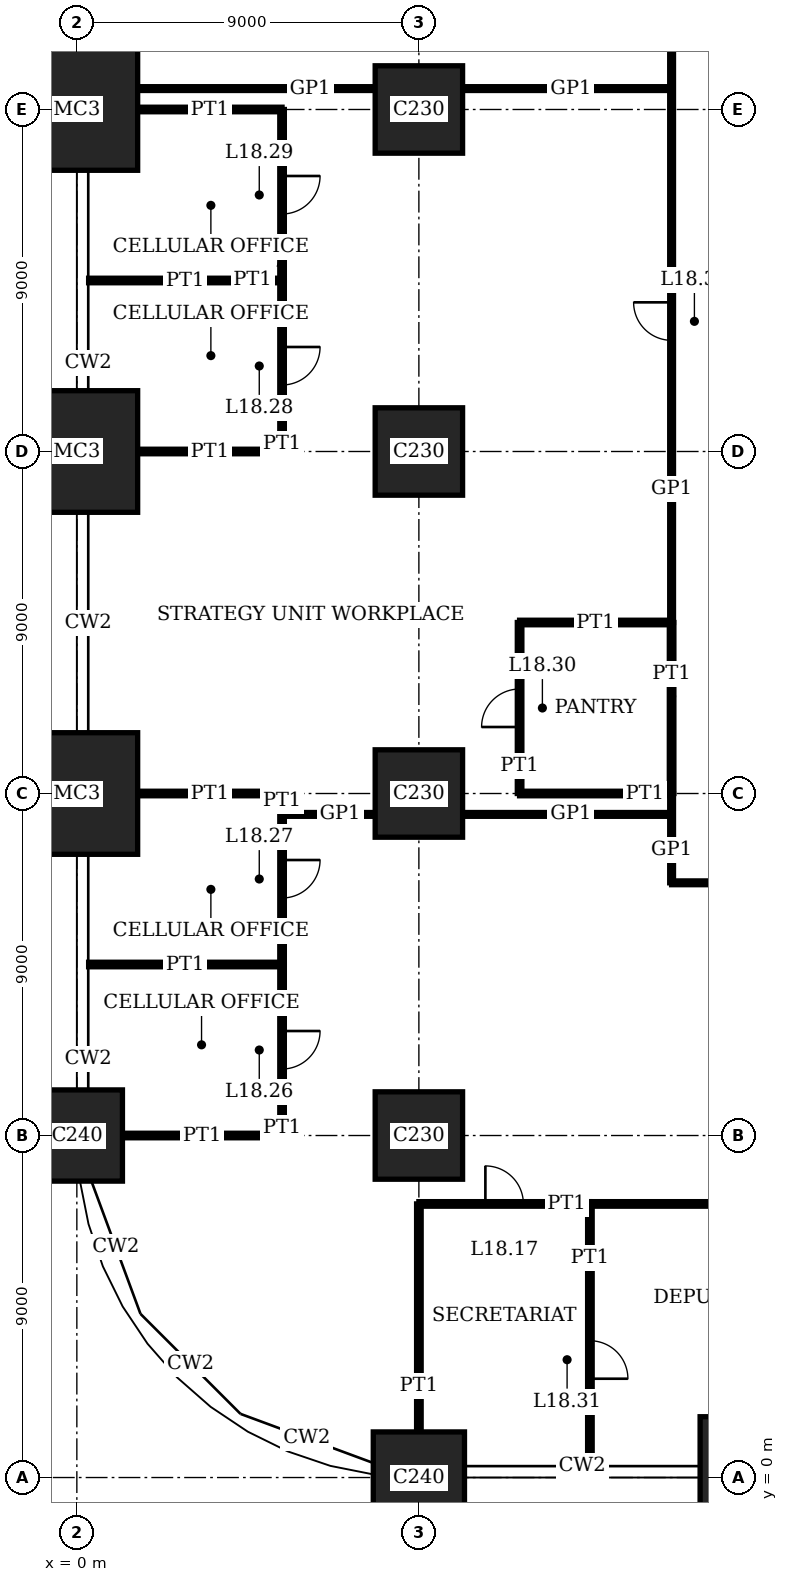
"""IFC4 building model, lengths in metres.
Left out: names, types, materials, properties, quantities, classifications, styles, units other than length and angle.
Written with IfcOpenShell. Run it as: python <this file> out.ifc"""

import sys

from ifc_helpers import new_model, si_unit, direction, frame, frame_2d, origin, origin_2d, place, context, subcontext, project, spatial, rectangle, extrude, element, fill, save


model = new_model("IFC4")
c1 = context("Model", 3, precision=1e-05, world=origin(), true_north=direction((0.0, 1.0)))
c2 = subcontext(c1, "Body", "Model", "MODEL_VIEW")
j1 = project(units=[si_unit("LENGTHUNIT", "METRE"), si_unit("PLANEANGLEUNIT", "RADIAN")], contexts=[c1])
p1 = place(None, origin())
s1 = spatial("IfcSite", under=j1, at=p1, CompositionType="ELEMENT")
p2 = place(p1, origin())
s2 = spatial("IfcBuilding", under=s1, at=p2, CompositionType="ELEMENT")
p3 = place(p2, frame((0.0, 0.0, 75.8)))
s3 = spatial("IfcBuildingStorey", under=s2, at=p3, CompositionType="ELEMENT", Elevation=75.8)
p4 = place(p3, frame((0.0, 9.0, 0.0), z_axis=(0.0, 0.0, 1.0), x_axis=(1.0, 0.0, 0.0)))
e1 = element("IfcColumn", 1, at=p4, inside=s3, PredefinedType="COLUMN", context=c2, shape_type="SweptSolid", body=[
    extrude(rectangle(XDim=2.4, YDim=2.4, at=origin_2d()), origin(), (0.0, 0.0, 1.0), 4.2),
])
for number, where, z_axis, x_axis in (
    (2, (0.0, 18.0, 0.0), (0.0, 0.0, 1.0), (1.0, 0.0, 0.0)),
    (3, (0.0, 27.0, 0.0), (0.0, 0.0, 1.0), (1.0, 0.0, 0.0)),
    (4, (0.0, 36.0, 0.0), (0.0, 0.0, 1.0), (1.0, 0.0, 0.0)),
):
    element("IfcColumn", number, at=place(p3, frame(where, z_axis=z_axis, x_axis=x_axis)), inside=s3, PredefinedType="COLUMN", context=c2, shape_type="SweptSolid", body=[
        extrude(rectangle(XDim=3.2, YDim=3.2, at=origin_2d()), origin(), (0.0, 0.0, 1.0), 4.2),
    ])
p5 = place(p3, frame((9.0, 0.0, 0.0), z_axis=(0.0, 0.0, 1.0), x_axis=(1.0, 0.0, 0.0)))
e5 = element("IfcColumn", 5, at=p5, inside=s3, PredefinedType="COLUMN", context=c2, shape_type="SweptSolid", body=[
    extrude(rectangle(XDim=2.4, YDim=2.4, at=origin_2d()), origin(), (0.0, 0.0, 1.0), 4.2),
])
for number, where, z_axis, x_axis in (
    (6, (9.0, 9.0, 0.0), (0.0, 0.0, 1.0), (1.0, 0.0, 0.0)),
    (7, (9.0, 18.0, 0.0), (0.0, 0.0, 1.0), (1.0, 0.0, 0.0)),
    (8, (9.0, 27.0, 0.0), (0.0, 0.0, 1.0), (1.0, 0.0, 0.0)),
    (9, (9.0, 36.0, 0.0), (0.0, 0.0, 1.0), (1.0, 0.0, 0.0)),
):
    element("IfcColumn", number, at=place(p3, frame(where, z_axis=z_axis, x_axis=x_axis)), inside=s3, PredefinedType="COLUMN", context=c2, shape_type="SweptSolid", body=[
        extrude(rectangle(XDim=2.3, YDim=2.3, at=origin_2d()), origin(), (0.0, 0.0, 1.0), 4.2),
    ])
p6 = place(p3, frame((18.0, 0.0, 0.0), z_axis=(0.0, 0.0, 1.0), x_axis=(1.0, 0.0, 0.0)))
e10 = element("IfcColumn", 10, at=p6, inside=s3, PredefinedType="COLUMN", context=c2, shape_type="SweptSolid", body=[
    extrude(rectangle(XDim=3.2, YDim=3.2, at=origin_2d()), origin(), (0.0, 0.0, 1.0), 4.2),
])
p7 = place(p3, frame((9.0, 7.2, 0.0), z_axis=(0.0, 0.0, 1.0), x_axis=(1.0, 0.0, 0.0)))
e11 = element("IfcWall", 11, at=p7, inside=s3, PredefinedType="PARTITIONING", context=c2, shape_type="SweptSolid", body=[
    extrude(rectangle(XDim=4.5, YDim=0.12, at=frame_2d((2.25, 0.0))), origin(), (0.0, 0.0, 1.0), 3.85),
])
p8 = place(p7, frame((1.75, 0.0, 0.0)))
e12 = element("IfcOpeningElement", 12, at=p8, cuts=e11, PredefinedType="OPENING", context=c2, shape_type="SweptSolid", body=[
    extrude(rectangle(XDim=1.0, YDim=2.4, at=frame_2d((0.5, 1.2))), frame((0.0, 0.07, 0.0), z_axis=(0.0, -1.0, 0.0), x_axis=(1.0, 0.0, 0.0)), (0.0, 0.0, 1.0), 0.14),
])
p9 = place(p3, frame((13.5, 7.2, 0.0), z_axis=(0.0, 0.0, 1.0), x_axis=(1.0, 0.0, 0.0)))
e13 = element("IfcWall", 13, at=p9, inside=s3, PredefinedType="PARTITIONING", context=c2, shape_type="SweptSolid", body=[
    extrude(rectangle(XDim=9.0, YDim=0.12, at=frame_2d((4.5, 0.0))), origin(), (0.0, 0.0, 1.0), 3.85),
])
p10 = place(p3, frame((1.2, 9.0, 0.0), z_axis=(0.0, 0.0, 1.0), x_axis=(1.0, 0.0, 0.0)))
e14 = element("IfcWall", 14, at=p10, inside=s3, PredefinedType="PARTITIONING", context=c2, shape_type="SweptSolid", body=[
    extrude(rectangle(XDim=4.2, YDim=0.12, at=frame_2d((2.1, 0.0))), origin(), (0.0, 0.0, 1.0), 3.05),
])
p11 = place(p3, frame((0.31, 13.5, 0.0), z_axis=(0.0, 0.0, 1.0), x_axis=(1.0, 0.0, 0.0)))
e15 = element("IfcWall", 15, at=p11, inside=s3, PredefinedType="PARTITIONING", context=c2, shape_type="SweptSolid", body=[
    extrude(rectangle(XDim=5.09, YDim=0.12, at=frame_2d((2.545, 0.0))), origin(), (0.0, 0.0, 1.0), 3.15),
])
p12 = place(p3, frame((15.65, 15.65, 0.0), z_axis=(0.0, 0.0, 1.0), x_axis=(1.0, 0.0, 0.0)))
e16 = element("IfcWall", 16, at=p12, inside=s3, PredefinedType="PARTITIONING", context=c2, shape_type="SweptSolid", body=[
    extrude(rectangle(XDim=24.85, YDim=0.1, at=frame_2d((12.425, 0.0))), origin(), (0.0, 0.0, 1.0), 3.85),
])
p13 = place(p12, frame((11.925, 0.0, 0.0)))
e17 = element("IfcOpeningElement", 17, at=p13, cuts=e16, PredefinedType="OPENING", context=c2, shape_type="SweptSolid", body=[
    extrude(rectangle(XDim=1.0, YDim=2.4, at=frame_2d((0.5, 1.2))), frame((0.0, 0.06, 0.0), z_axis=(0.0, -1.0, 0.0), x_axis=(1.0, 0.0, 0.0)), (0.0, 0.0, 1.0), 0.12),
])
p14 = place(p3, frame((5.39, 17.45, 0.0), z_axis=(0.0, 0.0, 1.0), x_axis=(1.0, 0.0, 0.0)))
e18 = element("IfcWall", 18, at=p14, inside=s3, PredefinedType="PARTITIONING", context=c2, shape_type="SweptSolid", body=[
    extrude(rectangle(XDim=2.46, YDim=0.1, at=frame_2d((1.23, 0.0))), origin(), (0.0, 0.0, 1.0), 3.85),
])
p15 = place(p3, frame((10.15, 17.45, 0.0), z_axis=(0.0, 0.0, 1.0), x_axis=(1.0, 0.0, 0.0)))
e19 = element("IfcWall", 19, at=p15, inside=s3, PredefinedType="PARTITIONING", context=c2, shape_type="SweptSolid", body=[
    extrude(rectangle(XDim=5.5, YDim=0.1, at=frame_2d((2.75, 0.0))), origin(), (0.0, 0.0, 1.0), 3.85),
])
p16 = place(p3, frame((11.65, 18.0, 0.0), z_axis=(0.0, 0.0, 1.0), x_axis=(1.0, 0.0, 0.0)))
e20 = element("IfcWall", 20, at=p16, inside=s3, PredefinedType="PARTITIONING", context=c2, shape_type="SweptSolid", body=[
    extrude(rectangle(XDim=4.0, YDim=0.12, at=frame_2d((2.0, 0.0))), origin(), (0.0, 0.0, 1.0), 3.25),
])
p17 = place(p3, frame((1.6, 18.0, 0.0), z_axis=(0.0, 0.0, 1.0), x_axis=(1.0, 0.0, 0.0)))
e21 = element("IfcWall", 21, at=p17, inside=s3, PredefinedType="PARTITIONING", context=c2, shape_type="SweptSolid", body=[
    extrude(rectangle(XDim=3.8, YDim=0.12, at=frame_2d((1.9, 0.0))), origin(), (0.0, 0.0, 1.0), 3.25),
])
p18 = place(p3, frame((11.65, 22.5, 0.0), z_axis=(0.0, 0.0, 1.0), x_axis=(1.0, 0.0, 0.0)))
e22 = element("IfcWall", 22, at=p18, inside=s3, PredefinedType="PARTITIONING", context=c2, shape_type="SweptSolid", body=[
    extrude(rectangle(XDim=4.0, YDim=0.12, at=frame_2d((2.0, 0.0))), origin(), (0.0, 0.0, 1.0), 3.15),
])
p19 = place(p3, frame((1.6, 27.0, 0.0), z_axis=(0.0, 0.0, 1.0), x_axis=(1.0, 0.0, 0.0)))
e23 = element("IfcWall", 23, at=p19, inside=s3, PredefinedType="PARTITIONING", context=c2, shape_type="SweptSolid", body=[
    extrude(rectangle(XDim=3.8, YDim=0.12, at=frame_2d((1.9, 0.0))), origin(), (0.0, 0.0, 1.0), 3.25),
])
p20 = place(p3, frame((0.31, 31.5, 0.0), z_axis=(0.0, 0.0, 1.0), x_axis=(1.0, 0.0, 0.0)))
e24 = element("IfcWall", 24, at=p20, inside=s3, PredefinedType="PARTITIONING", context=c2, shape_type="SweptSolid", body=[
    extrude(rectangle(XDim=5.09, YDim=0.12, at=frame_2d((2.545, 0.0))), origin(), (0.0, 0.0, 1.0), 3.15),
])
p21 = place(p3, frame((1.6, 36.0, 0.0), z_axis=(0.0, 0.0, 1.0), x_axis=(1.0, 0.0, 0.0)))
e25 = element("IfcWall", 25, at=p21, inside=s3, PredefinedType="PARTITIONING", context=c2, shape_type="SweptSolid", body=[
    extrude(rectangle(XDim=3.8, YDim=0.12, at=frame_2d((1.9, 0.0))), origin(), (0.0, 0.0, 1.0), 3.25),
])
p22 = place(p3, frame((1.6, 36.55, 0.0), z_axis=(0.0, 0.0, 1.0), x_axis=(1.0, 0.0, 0.0)))
e26 = element("IfcWall", 26, at=p22, inside=s3, PredefinedType="PARTITIONING", context=c2, shape_type="SweptSolid", body=[
    extrude(rectangle(XDim=6.25, YDim=0.1, at=frame_2d((3.125, 0.0))), origin(), (0.0, 0.0, 1.0), 3.85),
])
p23 = place(p3, frame((10.15, 36.55, 0.0), z_axis=(0.0, 0.0, 1.0), x_axis=(1.0, 0.0, 0.0)))
e27 = element("IfcWall", 27, at=p23, inside=s3, PredefinedType="PARTITIONING", context=c2, shape_type="SweptSolid", body=[
    extrude(rectangle(XDim=5.5, YDim=0.1, at=frame_2d((2.75, 0.0))), origin(), (0.0, 0.0, 1.0), 3.85),
])
p24 = place(p3, frame((5.4, 9.0, 0.0), z_axis=(0.0, 0.0, 1.0), x_axis=(0.0, 1.0, 0.0)))
e28 = element("IfcWall", 28, at=p24, inside=s3, PredefinedType="PARTITIONING", context=c2, shape_type="SweptSolid", body=[
    extrude(rectangle(XDim=4.5, YDim=0.12, at=frame_2d((2.25, 0.0))), origin(), (0.0, 0.0, 1.0), 3.85),
])
p25 = place(p24, frame((1.75, 0.0, 0.0)))
e29 = element("IfcOpeningElement", 29, at=p25, cuts=e28, PredefinedType="OPENING", context=c2, shape_type="SweptSolid", body=[
    extrude(rectangle(XDim=1.0, YDim=2.4, at=frame_2d((0.5, 1.2))), frame((0.0, 0.07, 0.0), z_axis=(0.0, -1.0, 0.0), x_axis=(1.0, 0.0, 0.0)), (0.0, 0.0, 1.0), 0.14),
])
p26 = place(p3, frame((5.4, 13.5, 0.0), z_axis=(0.0, 0.0, 1.0), x_axis=(0.0, 1.0, 0.0)))
e30 = element("IfcWall", 30, at=p26, inside=s3, PredefinedType="PARTITIONING", context=c2, shape_type="SweptSolid", body=[
    extrude(rectangle(XDim=4.5, YDim=0.12, at=frame_2d((2.25, 0.0))), origin(), (0.0, 0.0, 1.0), 3.85),
])
p27 = place(p26, frame((1.75, 0.0, 0.0)))
e31 = element("IfcOpeningElement", 31, at=p27, cuts=e30, PredefinedType="OPENING", context=c2, shape_type="SweptSolid", body=[
    extrude(rectangle(XDim=1.0, YDim=2.4, at=frame_2d((0.5, 1.2))), frame((0.0, 0.07, 0.0), z_axis=(0.0, -1.0, 0.0), x_axis=(1.0, 0.0, 0.0)), (0.0, 0.0, 1.0), 0.14),
])
p28 = place(p3, frame((5.4, 27.0, 0.0), z_axis=(0.0, 0.0, 1.0), x_axis=(0.0, 1.0, 0.0)))
e32 = element("IfcWall", 32, at=p28, inside=s3, PredefinedType="PARTITIONING", context=c2, shape_type="SweptSolid", body=[
    extrude(rectangle(XDim=4.5, YDim=0.12, at=frame_2d((2.25, 0.0))), origin(), (0.0, 0.0, 1.0), 3.85),
])
p29 = place(p28, frame((1.75, 0.0, 0.0)))
e33 = element("IfcOpeningElement", 33, at=p29, cuts=e32, PredefinedType="OPENING", context=c2, shape_type="SweptSolid", body=[
    extrude(rectangle(XDim=1.0, YDim=2.4, at=frame_2d((0.5, 1.2))), frame((0.0, 0.07, 0.0), z_axis=(0.0, -1.0, 0.0), x_axis=(1.0, 0.0, 0.0)), (0.0, 0.0, 1.0), 0.14),
])
p30 = place(p3, frame((5.4, 31.5, 0.0), z_axis=(0.0, 0.0, 1.0), x_axis=(0.0, 1.0, 0.0)))
e34 = element("IfcWall", 34, at=p30, inside=s3, PredefinedType="PARTITIONING", context=c2, shape_type="SweptSolid", body=[
    extrude(rectangle(XDim=4.5, YDim=0.12, at=frame_2d((2.25, 0.0))), origin(), (0.0, 0.0, 1.0), 3.85),
])
p31 = place(p30, frame((1.75, 0.0, 0.0)))
e35 = element("IfcOpeningElement", 35, at=p31, cuts=e34, PredefinedType="OPENING", context=c2, shape_type="SweptSolid", body=[
    extrude(rectangle(XDim=1.0, YDim=2.4, at=frame_2d((0.5, 1.2))), frame((0.0, 0.07, 0.0), z_axis=(0.0, -1.0, 0.0), x_axis=(1.0, 0.0, 0.0)), (0.0, 0.0, 1.0), 0.14),
])
p32 = place(p3, frame((9.0, 1.2, 0.0), z_axis=(0.0, 0.0, 1.0), x_axis=(0.0, 1.0, 0.0)))
e36 = element("IfcWall", 36, at=p32, inside=s3, PredefinedType="PARTITIONING", context=c2, shape_type="SweptSolid", body=[
    extrude(rectangle(XDim=6.0, YDim=0.12, at=frame_2d((3.0, 0.0))), origin(), (0.0, 0.0, 1.0), 3.05),
])
p33 = place(p3, frame((11.65, 18.0, 0.0), z_axis=(0.0, 0.0, 1.0), x_axis=(0.0, 1.0, 0.0)))
e37 = element("IfcWall", 37, at=p33, inside=s3, PredefinedType="PARTITIONING", context=c2, shape_type="SweptSolid", body=[
    extrude(rectangle(XDim=4.5, YDim=0.12, at=frame_2d((2.25, 0.0))), origin(), (0.0, 0.0, 1.0), 3.85),
])
p34 = place(p33, frame((1.75, 0.0, 0.0)))
e38 = element("IfcOpeningElement", 38, at=p34, cuts=e37, PredefinedType="OPENING", context=c2, shape_type="SweptSolid", body=[
    extrude(rectangle(XDim=1.0, YDim=2.4, at=frame_2d((0.5, 1.2))), frame((0.0, 0.07, 0.0), z_axis=(0.0, -1.0, 0.0), x_axis=(1.0, 0.0, 0.0)), (0.0, 0.0, 1.0), 0.14),
])
p35 = place(p3, frame((13.5, 0.31, 0.0), z_axis=(0.0, 0.0, 1.0), x_axis=(0.0, 1.0, 0.0)))
e39 = element("IfcWall", 39, at=p35, inside=s3, PredefinedType="PARTITIONING", context=c2, shape_type="SweptSolid", body=[
    extrude(rectangle(XDim=6.89, YDim=0.12, at=frame_2d((3.445, 0.0))), origin(), (0.0, 0.0, 1.0), 3.85),
])
p36 = place(p35, frame((2.29, 0.0, 0.0)))
e40 = element("IfcOpeningElement", 40, at=p36, cuts=e39, PredefinedType="OPENING", context=c2, shape_type="SweptSolid", body=[
    extrude(rectangle(XDim=1.0, YDim=2.4, at=frame_2d((0.5, 1.2))), frame((0.0, 0.07, 0.0), z_axis=(0.0, -1.0, 0.0), x_axis=(1.0, 0.0, 0.0)), (0.0, 0.0, 1.0), 0.14),
])
p37 = place(p3, frame((15.65, 18.0, 0.0), z_axis=(0.0, 0.0, 1.0), x_axis=(0.0, 1.0, 0.0)))
e41 = element("IfcWall", 41, at=p37, inside=s3, PredefinedType="PARTITIONING", context=c2, shape_type="SweptSolid", body=[
    extrude(rectangle(XDim=4.5, YDim=0.12, at=frame_2d((2.25, 0.0))), origin(), (0.0, 0.0, 1.0), 3.85),
])
p38 = place(p3, frame((15.65, 15.65, 0.0), z_axis=(0.0, 0.0, 1.0), x_axis=(0.0, 1.0, 0.0)))
e42 = element("IfcWall", 42, at=p38, inside=s3, PredefinedType="PARTITIONING", context=c2, shape_type="SweptSolid", body=[
    extrude(rectangle(XDim=2.35, YDim=0.1, at=frame_2d((1.175, 0.0))), origin(), (0.0, 0.0, 1.0), 3.85),
])
p39 = place(p3, frame((15.65, 22.5, 0.0), z_axis=(0.0, 0.0, 1.0), x_axis=(0.0, 1.0, 0.0)))
e43 = element("IfcWall", 43, at=p39, inside=s3, PredefinedType="PARTITIONING", context=c2, shape_type="SweptSolid", body=[
    extrude(rectangle(XDim=15.85, YDim=0.1, at=frame_2d((7.925, 0.0))), origin(), (0.0, 0.0, 1.0), 3.85),
])
p40 = place(p39, frame((7.425, 0.0, 0.0)))
e44 = element("IfcOpeningElement", 44, at=p40, cuts=e43, PredefinedType="OPENING", context=c2, shape_type="SweptSolid", body=[
    extrude(rectangle(XDim=1.0, YDim=2.4, at=frame_2d((0.5, 1.2))), frame((0.0, 0.06, 0.0), z_axis=(0.0, -1.0, 0.0), x_axis=(1.0, 0.0, 0.0)), (0.0, 0.0, 1.0), 0.12),
])
p41 = place(p8, origin())
e45 = element("IfcDoor", 45, at=p41, inside=s3, OperationType="SINGLE_SWING_RIGHT", PredefinedType="DOOR", context=c2, shape_type="SweptSolid", body=[
    extrude(rectangle(XDim=1.0, YDim=2.4, at=frame_2d((0.5, 1.2))), frame((0.0, 0.025, 0.0), z_axis=(0.0, -1.0, 0.0), x_axis=(1.0, 0.0, 0.0)), (0.0, 0.0, 1.0), 0.05),
])
fill(e12, e45)
p42 = place(p25, origin())
e46 = element("IfcDoor", 46, at=p42, inside=s3, OperationType="SINGLE_SWING_RIGHT", PredefinedType="DOOR", context=c2, shape_type="SweptSolid", body=[
    extrude(rectangle(XDim=1.0, YDim=2.4, at=frame_2d((0.5, 1.2))), frame((0.0, 0.025, 0.0), z_axis=(0.0, -1.0, 0.0), x_axis=(1.0, 0.0, 0.0)), (0.0, 0.0, 1.0), 0.05),
])
fill(e29, e46)
p43 = place(p27, origin())
e47 = element("IfcDoor", 47, at=p43, inside=s3, OperationType="SINGLE_SWING_RIGHT", PredefinedType="DOOR", context=c2, shape_type="SweptSolid", body=[
    extrude(rectangle(XDim=1.0, YDim=2.4, at=frame_2d((0.5, 1.2))), frame((0.0, 0.025, 0.0), z_axis=(0.0, -1.0, 0.0), x_axis=(1.0, 0.0, 0.0)), (0.0, 0.0, 1.0), 0.05),
])
fill(e31, e47)
p44 = place(p29, origin())
e48 = element("IfcDoor", 48, at=p44, inside=s3, OperationType="SINGLE_SWING_RIGHT", PredefinedType="DOOR", context=c2, shape_type="SweptSolid", body=[
    extrude(rectangle(XDim=1.0, YDim=2.4, at=frame_2d((0.5, 1.2))), frame((0.0, 0.025, 0.0), z_axis=(0.0, -1.0, 0.0), x_axis=(1.0, 0.0, 0.0)), (0.0, 0.0, 1.0), 0.05),
])
fill(e33, e48)
p45 = place(p31, origin())
e49 = element("IfcDoor", 49, at=p45, inside=s3, OperationType="SINGLE_SWING_RIGHT", PredefinedType="DOOR", context=c2, shape_type="SweptSolid", body=[
    extrude(rectangle(XDim=1.0, YDim=2.4, at=frame_2d((0.5, 1.2))), frame((0.0, 0.025, 0.0), z_axis=(0.0, -1.0, 0.0), x_axis=(1.0, 0.0, 0.0)), (0.0, 0.0, 1.0), 0.05),
])
fill(e35, e49)
p46 = place(p34, origin())
e50 = element("IfcDoor", 50, at=p46, inside=s3, OperationType="SINGLE_SWING_RIGHT", PredefinedType="DOOR", context=c2, shape_type="SweptSolid", body=[
    extrude(rectangle(XDim=1.0, YDim=2.4, at=frame_2d((0.5, 1.2))), frame((0.0, 0.025, 0.0), z_axis=(0.0, -1.0, 0.0), x_axis=(1.0, 0.0, 0.0)), (0.0, 0.0, 1.0), 0.05),
])
fill(e38, e50)
p47 = place(p36, origin())
e51 = element("IfcDoor", 51, at=p47, inside=s3, OperationType="SINGLE_SWING_LEFT", PredefinedType="DOOR", context=c2, shape_type="SweptSolid", body=[
    extrude(rectangle(XDim=1.0, YDim=2.4, at=frame_2d((0.5, 1.2))), frame((0.0, 0.025, 0.0), z_axis=(0.0, -1.0, 0.0), x_axis=(1.0, 0.0, 0.0)), (0.0, 0.0, 1.0), 0.05),
])
fill(e40, e51)
p48 = place(p40, origin())
e52 = element("IfcDoor", 52, at=p48, inside=s3, OperationType="SINGLE_SWING_LEFT", PredefinedType="DOOR", context=c2, shape_type="SweptSolid", body=[
    extrude(rectangle(XDim=1.0, YDim=2.4, at=frame_2d((0.5, 1.2))), frame((0.0, 0.02, 0.0), z_axis=(0.0, -1.0, 0.0), x_axis=(1.0, 0.0, 0.0)), (0.0, 0.0, 1.0), 0.04),
])
fill(e44, e52)
save(model, sys.argv[1])
